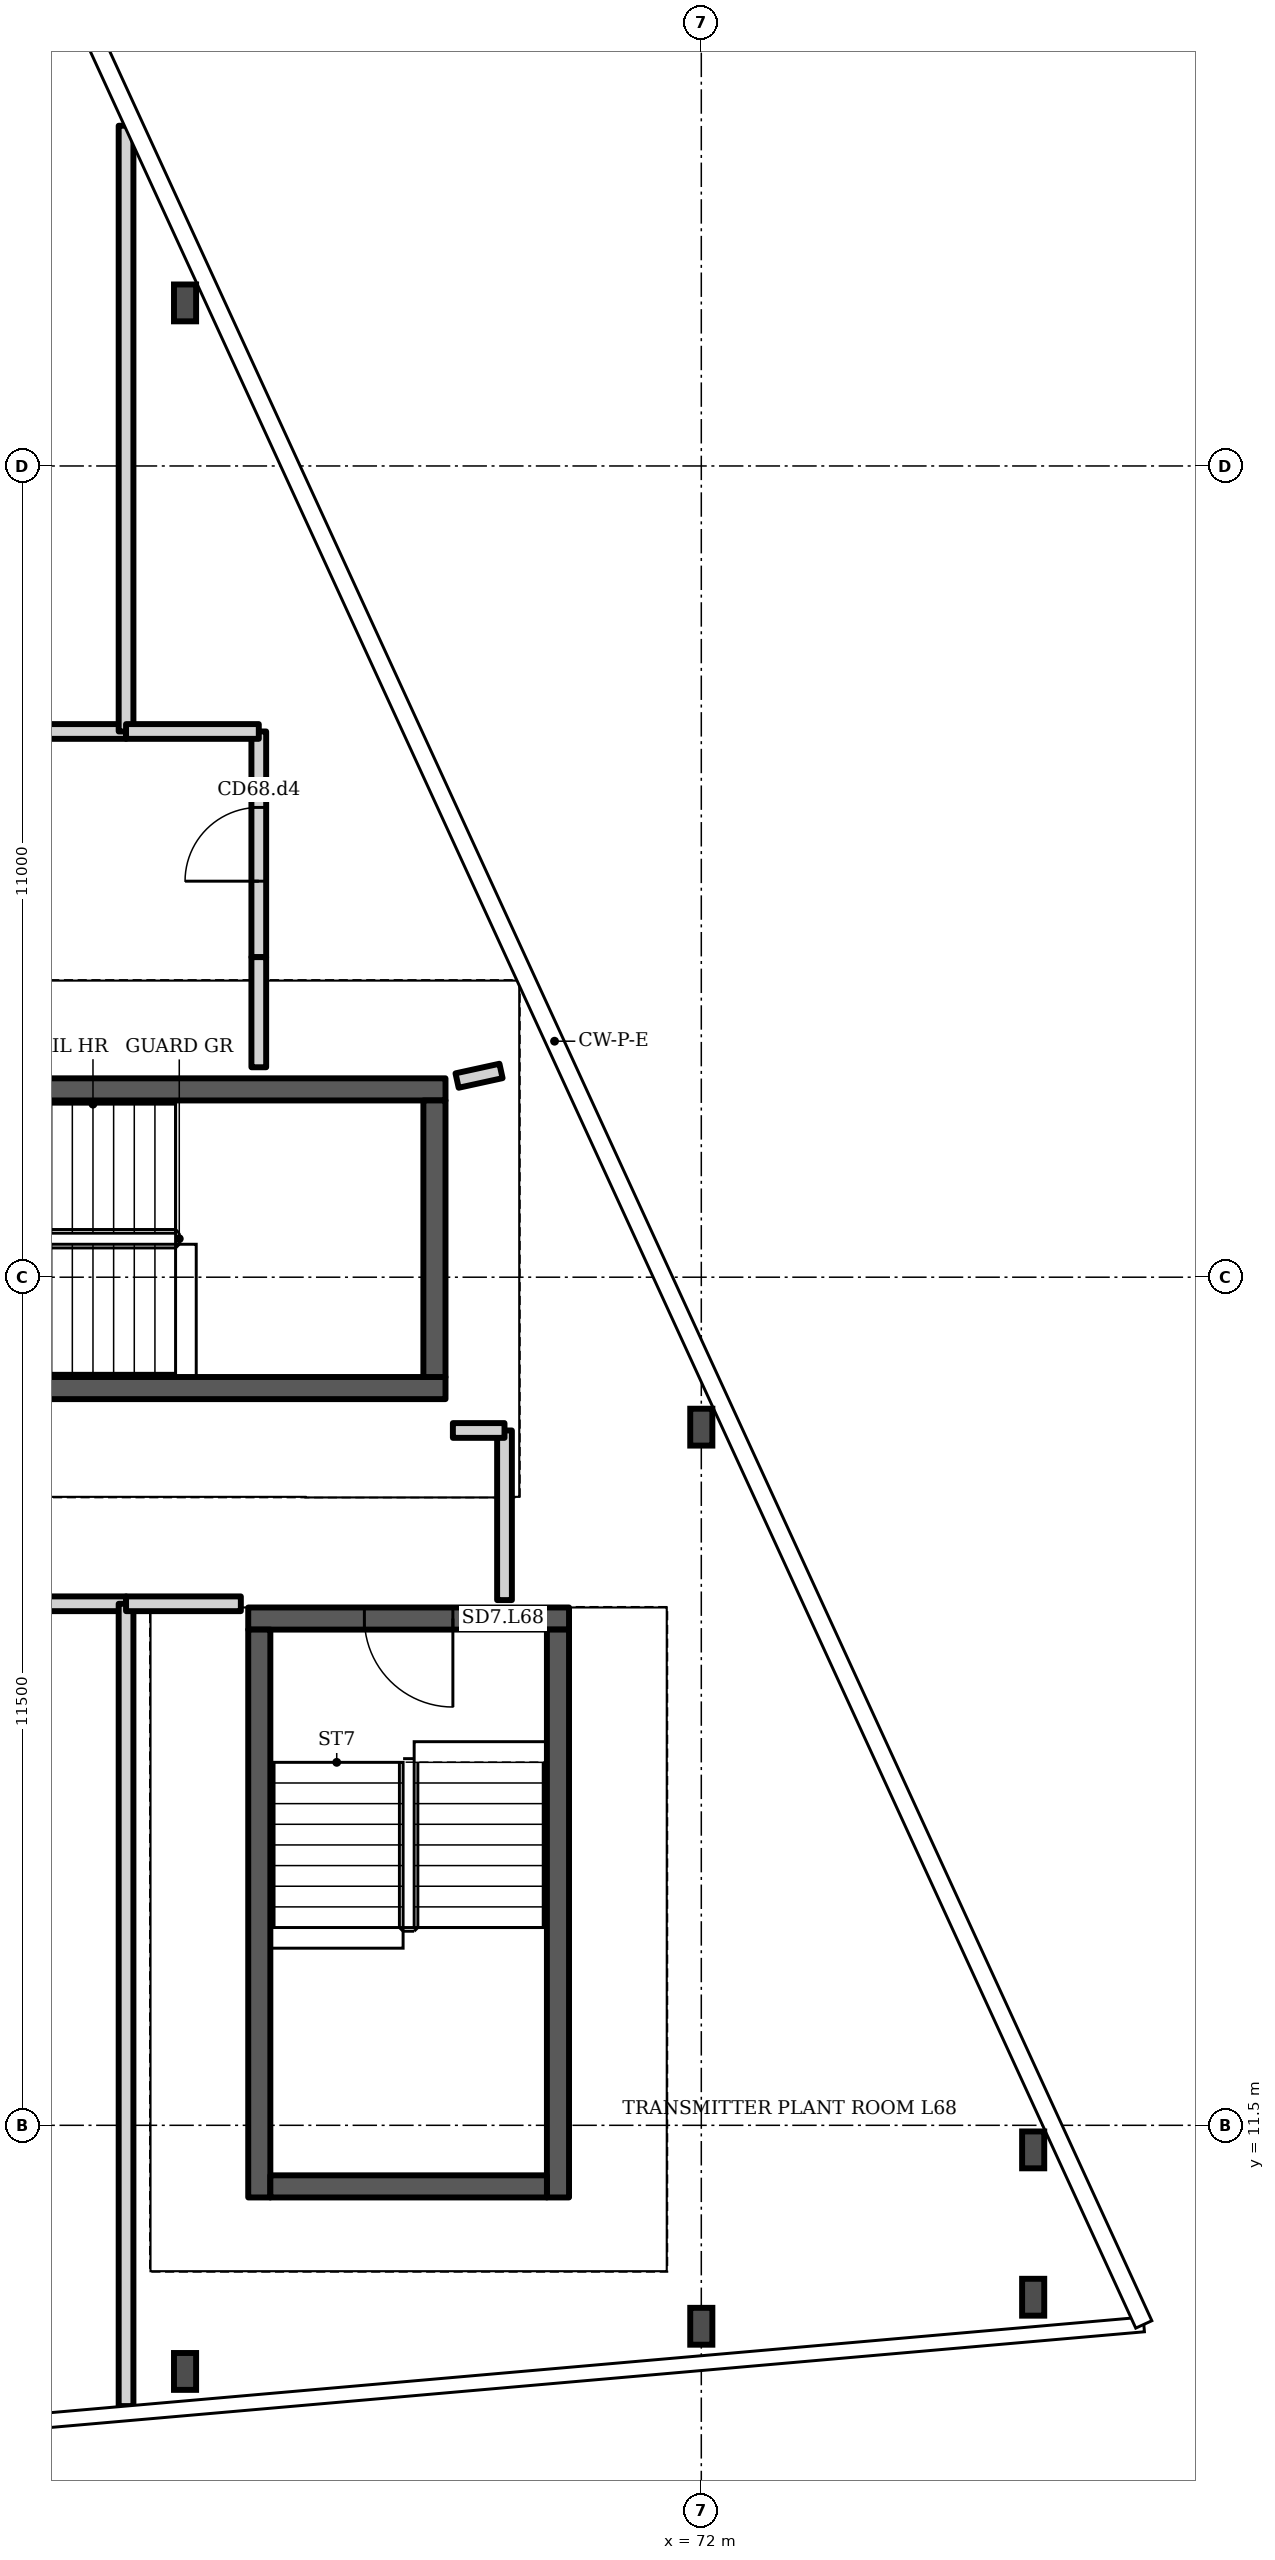
"""IFC4 building model, lengths in metres.
Left out: names, types, materials, properties, quantities, classifications, styles, units other than length and angle.
Written with IfcOpenShell. Run it as: python <this file> out.ifc"""

import sys

from ifc_helpers import new_model, si_unit, direction, frame, frame_2d, origin, origin_2d, place, context, subcontext, project, spatial, rectangle, i_section, extrude, element, fill, save


model = new_model("IFC4")
c1 = context("Model", 3, precision=1e-05, world=origin(), true_north=direction((0.0, 1.0)))
c2 = subcontext(c1, "Body", "Model", "MODEL_VIEW")
j1 = project(units=[si_unit("LENGTHUNIT", "METRE"), si_unit("PLANEANGLEUNIT", "RADIAN")], contexts=[c1])
p1 = place(None, origin())
s1 = spatial("IfcSite", under=j1, at=p1, CompositionType="ELEMENT")
p2 = place(p1, origin())
s2 = spatial("IfcBuilding", under=s1, at=p2, CompositionType="ELEMENT")
p3 = place(p2, frame((0.0, 0.0, 267.5)))
s3 = spatial("IfcBuildingStorey", under=s2, at=p3, CompositionType="ELEMENT", Elevation=267.5)
for number, where, z_axis, x_axis in (
    (1, (65.0, 8.163, 0.0), (0.0, 0.0, 1.0), (1.0, 0.0, 0.0)),
    (2, (65.0, 36.211, 0.0), (0.0, 0.0, 1.0), (1.0, 0.0, 0.0)),
    (3, (72.0, 8.775, 0.0), (0.0, 0.0, 1.0), (1.0, 0.0, 0.0)),
    (4, (72.0, 20.967, 0.0), (0.0, 0.0, 1.0), (1.0, 0.0, 0.0)),
    (5, (76.5, 9.169, 0.0), (0.0, 0.0, 1.0), (1.0, 0.0, 0.0)),
    (6, (76.5, 11.167, 0.0), (0.0, 0.0, 1.0), (1.0, 0.0, 0.0)),
):
    element("IfcColumn", number, at=place(p3, frame(where, z_axis=z_axis, x_axis=x_axis)), inside=s3, PredefinedType="COLUMN", context=c2, shape_type="SweptSolid", body=[
        extrude(i_section(OverallWidth=0.3, OverallDepth=0.5, WebThickness=0.014, FlangeThickness=0.028, FilletRadius=0.027, at=origin_2d()), origin(), (0.0, 0.0, 1.0), 3.2),
    ])
p4 = place(p3, frame((58.4, 18.572, 0.0), z_axis=(0.0, 0.0, 1.0), x_axis=(1.0, 0.0, 0.0)))
e7 = element("IfcWall", 7, at=p4, inside=s3, PredefinedType="PARTITIONING", context=c2, shape_type="SweptSolid", body=[
    extrude(rectangle(XDim=5.8, YDim=0.2, at=frame_2d((2.9, 0.0))), origin(), (0.0, 0.0, 1.0), 2.8),
])
p5 = place(p3, frame((64.2, 18.572, 0.0), z_axis=(0.0, 0.0, 1.0), x_axis=(0.0, -1.0, 0.0)))
e8 = element("IfcWall", 8, at=p5, inside=s3, PredefinedType="PARTITIONING", context=c2, shape_type="SweptSolid", body=[
    extrude(rectangle(XDim=10.879, YDim=0.2, at=frame_2d((5.439, 0.0))), origin(), (0.0, 0.0, 1.0), 2.8),
])
p6 = place(p3, frame((64.2, 30.4, 0.0), z_axis=(0.0, 0.0, 1.0), x_axis=(-1.0, 0.0, 0.0)))
e9 = element("IfcWall", 9, at=p6, inside=s3, PredefinedType="PARTITIONING", context=c2, shape_type="SweptSolid", body=[
    extrude(rectangle(XDim=13.1, YDim=0.2, at=frame_2d((6.55, 0.0))), origin(), (0.0, 0.0, 1.0), 2.8),
])
p7 = place(p6, frame((6.4, 0.0, 0.0)))
e10 = element("IfcOpeningElement", 10, at=p7, cuts=e9, PredefinedType="OPENING", context=c2, shape_type="SweptSolid", body=[
    extrude(rectangle(XDim=1.0, YDim=2.1, at=frame_2d((0.5, 1.05))), frame((0.0, 0.11, 0.0), z_axis=(0.0, -1.0, 0.0), x_axis=(1.0, 0.0, 0.0)), (0.0, 0.0, 1.0), 0.22),
])
p8 = place(p3, frame((64.2, 38.614, 0.0), z_axis=(0.0, 0.0, 1.0), x_axis=(0.0, -1.0, 0.0)))
e11 = element("IfcWall", 11, at=p8, inside=s3, PredefinedType="PARTITIONING", context=c2, shape_type="SweptSolid", body=[
    extrude(rectangle(XDim=8.214, YDim=0.2, at=frame_2d((4.107, 0.0))), origin(), (0.0, 0.0, 1.0), 2.8),
])
p9 = place(p3, frame((69.332, 18.622, 0.0), z_axis=(0.0, 0.0, 1.0), x_axis=(0.0, 1.0, 0.0)))
e12 = element("IfcWall", 12, at=p9, inside=s3, PredefinedType="PARTITIONING", context=c2, shape_type="SweptSolid", body=[
    extrude(rectangle(XDim=2.3, YDim=0.2, at=frame_2d((1.15, 0.0))), origin(), (0.0, 0.0, 1.0), 2.8),
])
p10 = place(p3, frame((69.332, 20.922, 0.0), z_axis=(0.0, 0.0, 1.0), x_axis=(-1.0, 0.0, 0.0)))
e13 = element("IfcWall", 13, at=p10, inside=s3, PredefinedType="PARTITIONING", context=c2, shape_type="SweptSolid", body=[
    extrude(rectangle(XDim=0.7, YDim=0.2, at=frame_2d((0.35, 0.0))), origin(), (0.0, 0.0, 1.0), 2.8),
])
p11 = place(p3, frame((66.0, 27.34, 0.0), z_axis=(0.0, 0.0, 1.0), x_axis=(0.0, 1.0, 0.0)))
e14 = element("IfcWall", 14, at=p11, inside=s3, PredefinedType="PARTITIONING", context=c2, shape_type="SweptSolid", body=[
    extrude(rectangle(XDim=3.06, YDim=0.2, at=frame_2d((1.53, 0.0))), origin(), (0.0, 0.0, 1.0), 2.8),
])
p12 = place(p11, frame((1.03, 0.0, 0.0)))
e15 = element("IfcOpeningElement", 15, at=p12, cuts=e14, PredefinedType="OPENING", context=c2, shape_type="SweptSolid", body=[
    extrude(rectangle(XDim=1.0, YDim=2.1, at=frame_2d((0.5, 1.05))), frame((0.0, 0.11, 0.0), z_axis=(0.0, -1.0, 0.0), x_axis=(1.0, 0.0, 0.0)), (0.0, 0.0, 1.0), 0.22),
])
p13 = place(p3, frame((66.0, 30.4, 0.0), z_axis=(0.0, 0.0, 1.0), x_axis=(-1.0, 0.0, 0.0)))
e16 = element("IfcWall", 16, at=p13, inside=s3, PredefinedType="PARTITIONING", context=c2, shape_type="SweptSolid", body=[
    extrude(rectangle(XDim=1.8, YDim=0.2, at=frame_2d((0.9, 0.0))), origin(), (0.0, 0.0, 1.0), 2.8),
])
p14 = place(p3, frame((64.2, 18.572, 0.0), z_axis=(0.0, 0.0, 1.0), x_axis=(1.0, 0.0, 0.0)))
e17 = element("IfcWall", 17, at=p14, inside=s3, PredefinedType="PARTITIONING", context=c2, shape_type="SweptSolid", body=[
    extrude(rectangle(XDim=1.557, YDim=0.2, at=frame_2d((0.778, 0.0))), origin(), (0.0, 0.0, 1.0), 2.8),
])
p15 = place(p3, frame((68.689, 25.667, 0.0), z_axis=(0.0, 0.0, 1.0), x_axis=(0.976941, 0.213493, 0.0)))
e18 = element("IfcWall", 18, at=p15, inside=s3, PredefinedType="PARTITIONING", context=c2, shape_type="SweptSolid", body=[
    extrude(rectangle(XDim=0.61, YDim=0.2, at=frame_2d((0.305, 0.0))), origin(), (0.0, 0.0, 1.0), 2.8),
])
p16 = place(p3, frame((66.0, 25.847, 0.0), z_axis=(0.0, 0.0, 1.0), x_axis=(0.0, 1.0, 0.0)))
e19 = element("IfcWall", 19, at=p16, inside=s3, PredefinedType="PARTITIONING", context=c2, shape_type="SweptSolid", body=[
    extrude(rectangle(XDim=1.493, YDim=0.2, at=frame_2d((0.747, 0.0))), origin(), (0.0, 0.0, 1.0), 2.8),
])
p17 = place(p3, frame((65.857, 18.372, 0.0), z_axis=(0.0, 0.0, 1.0), x_axis=(1.0, 0.0, 0.0)))
e20 = element("IfcWall", 20, at=p17, inside=s3, PredefinedType="SHEAR", context=c2, shape_type="SweptSolid", body=[
    extrude(rectangle(XDim=4.35, YDim=0.3, at=frame_2d((2.175, 0.0))), origin(), (0.0, 0.0, 1.0), 2.8),
])
p18 = place(p17, frame((1.575, 0.0, 0.0)))
e21 = element("IfcOpeningElement", 21, at=p18, cuts=e20, PredefinedType="OPENING", context=c2, shape_type="SweptSolid", body=[
    extrude(rectangle(XDim=1.2, YDim=2.1, at=frame_2d((0.6, 1.05))), frame((0.0, 0.16, 0.0), z_axis=(0.0, -1.0, 0.0), x_axis=(1.0, 0.0, 0.0)), (0.0, 0.0, 1.0), 0.32),
])
for number, where, z_axis, x_axis in (
    (22, (66.007, 10.522, 0.0), (0.0, 0.0, 1.0), (0.0, 1.0, 0.0)),
    (23, (70.057, 10.522, 0.0), (0.0, 0.0, 1.0), (0.0, 1.0, 0.0)),
):
    element("IfcWall", number, at=place(p3, frame(where, z_axis=z_axis, x_axis=x_axis)), inside=s3, PredefinedType="SHEAR", context=c2, shape_type="SweptSolid", body=[
        extrude(rectangle(XDim=7.7, YDim=0.3, at=frame_2d((3.85, 0.0))), origin(), (0.0, 0.0, 1.0), 2.8),
    ])
p19 = place(p3, frame((66.156, 10.672, 0.0), z_axis=(0.0, 0.0, 1.0), x_axis=(1.0, 0.0, 0.0)))
e24 = element("IfcWall", 24, at=p19, inside=s3, PredefinedType="SHEAR", context=c2, shape_type="SweptSolid", body=[
    extrude(rectangle(XDim=3.75, YDim=0.3, at=frame_2d((1.875, 0.0))), origin(), (0.0, 0.0, 1.0), 2.8),
])
for number, where, z_axis, x_axis in (
    (25, (60.832, 21.497, 0.0), (0.0, 0.0, 1.0), (1.0, 0.0, 0.0)),
    (26, (60.832, 25.547, 0.0), (0.0, 0.0, 1.0), (1.0, 0.0, 0.0)),
):
    element("IfcWall", number, at=place(p3, frame(where, z_axis=z_axis, x_axis=x_axis)), inside=s3, PredefinedType="SHEAR", context=c2, shape_type="SweptSolid", body=[
        extrude(rectangle(XDim=7.7, YDim=0.3, at=frame_2d((3.85, 0.0))), origin(), (0.0, 0.0, 1.0), 2.8),
    ])
p20 = place(p3, frame((68.382, 21.647, 0.0), z_axis=(0.0, 0.0, 1.0), x_axis=(0.0, 1.0, 0.0)))
e27 = element("IfcWall", 27, at=p20, inside=s3, PredefinedType="SHEAR", context=c2, shape_type="SweptSolid", body=[
    extrude(rectangle(XDim=3.75, YDim=0.3, at=frame_2d((1.875, 0.0))), origin(), (0.0, 0.0, 1.0), 2.8),
])
p21 = place(p12, origin())
e28 = element("IfcDoor", 28, at=p21, inside=s3, OperationType="SINGLE_SWING_LEFT", PredefinedType="DOOR", context=c2, shape_type="SweptSolid", body=[
    extrude(rectangle(XDim=1.0, YDim=2.1, at=frame_2d((0.5, 1.05))), frame((0.0, 0.025, 0.0), z_axis=(0.0, -1.0, 0.0), x_axis=(1.0, 0.0, 0.0)), (0.0, 0.0, 1.0), 0.05),
])
fill(e15, e28)
p22 = place(p18, origin())
e29 = element("IfcDoor", 29, at=p22, inside=s3, OperationType="SINGLE_SWING_RIGHT", PredefinedType="DOOR", context=c2, shape_type="SweptSolid", body=[
    extrude(rectangle(XDim=1.2, YDim=2.1, at=frame_2d((0.6, 1.05))), frame((0.0, 0.025, 0.0), z_axis=(0.0, -1.0, 0.0), x_axis=(1.0, 0.0, 0.0)), (0.0, 0.0, 1.0), 0.05),
])
fill(e21, e29)
save(model, sys.argv[1])
